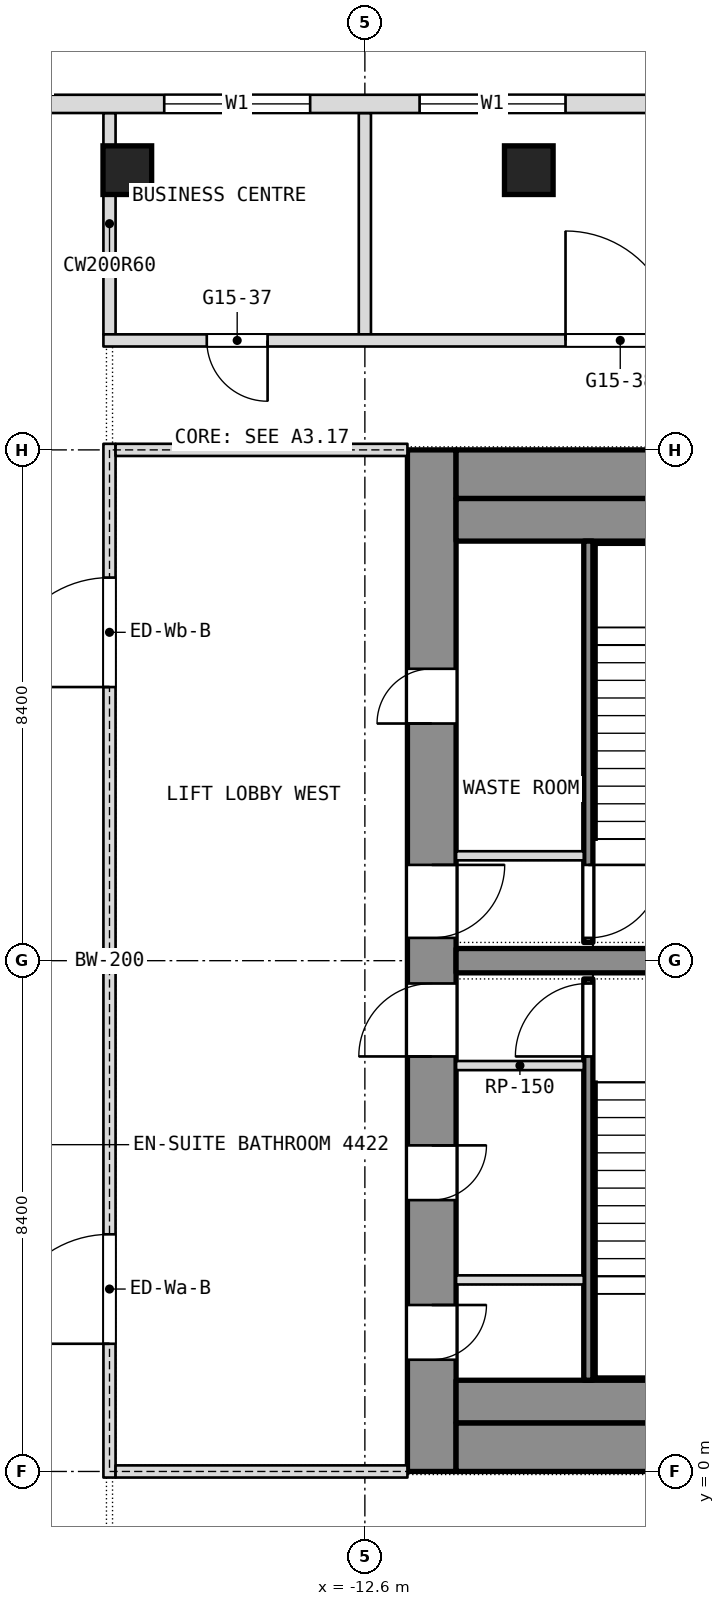
"""IFC4 building model, lengths in metres.
Left out: names, types, materials, properties, quantities, classifications, styles, units other than length and angle.
Written with IfcOpenShell. Run it as: python <this file> out.ifc"""

import sys

from ifc_helpers import new_model, si_unit, direction, frame, frame_2d, origin, origin_2d, place, context, subcontext, project, spatial, rectangle, extrude, element, fill, save


model = new_model("IFC4")
c1 = context("Model", 3, precision=1e-05, world=origin(), true_north=direction((0.0, 1.0)))
c2 = subcontext(c1, "Body", "Model", "MODEL_VIEW")
j1 = project(units=[si_unit("LENGTHUNIT", "METRE"), si_unit("PLANEANGLEUNIT", "RADIAN")], contexts=[c1])
p1 = place(None, origin())
s1 = spatial("IfcSite", under=j1, at=p1, CompositionType="ELEMENT")
p2 = place(p1, origin())
s2 = spatial("IfcBuilding", under=s1, at=p2, CompositionType="ELEMENT")
p3 = place(p2, frame((0.0, 0.0, 194.9)))
s3 = spatial("IfcBuildingStorey", under=s2, at=p3, CompositionType="ELEMENT", Elevation=194.9)
p4 = place(p3, frame((-11.5, 0.0, 0.0), z_axis=(0.0, 0.0, 1.0), x_axis=(0.0, 1.0, 0.0)))
e1 = element("IfcWall", 1, at=p4, inside=s3, PredefinedType="SHEAR", context=c2, shape_type="SweptSolid", body=[
    extrude(rectangle(XDim=16.8, YDim=0.8, at=frame_2d((8.4, 0.0))), origin(), (0.0, 0.0, 1.0), 3.6),
])
p5 = place(p4, frame((1.837, 0.0, 0.0)))
e2 = element("IfcOpeningElement", 2, at=p5, cuts=e1, PredefinedType="OPENING", context=c2, shape_type="SweptSolid", body=[
    extrude(rectangle(XDim=0.9, YDim=2.1, at=frame_2d((0.45, 1.05))), frame((0.0, 0.4, 0.0), z_axis=(0.0, -1.0, 0.0), x_axis=(1.0, 0.0, 0.0)), (0.0, 0.0, 1.0), 0.8),
])
p6 = place(p4, frame((4.462, 0.0, 0.0)))
e3 = element("IfcOpeningElement", 3, at=p6, cuts=e1, PredefinedType="OPENING", context=c2, shape_type="SweptSolid", body=[
    extrude(rectangle(XDim=0.9, YDim=2.1, at=frame_2d((0.45, 1.05))), frame((0.0, 0.4, 0.0), z_axis=(0.0, -1.0, 0.0), x_axis=(1.0, 0.0, 0.0)), (0.0, 0.0, 1.0), 0.8),
])
p7 = place(p4, frame((6.825, 0.0, 0.0)))
e4 = element("IfcOpeningElement", 4, at=p7, cuts=e1, PredefinedType="OPENING", context=c2, shape_type="SweptSolid", body=[
    extrude(rectangle(XDim=1.2, YDim=2.1, at=frame_2d((0.6, 1.05))), frame((0.0, 0.4, 0.0), z_axis=(0.0, -1.0, 0.0), x_axis=(1.0, 0.0, 0.0)), (0.0, 0.0, 1.0), 0.8),
])
p8 = place(p4, frame((12.3, 0.0, 0.0)))
e5 = element("IfcOpeningElement", 5, at=p8, cuts=e1, PredefinedType="OPENING", context=c2, shape_type="SweptSolid", body=[
    extrude(rectangle(XDim=0.9, YDim=2.1, at=frame_2d((0.45, 1.05))), frame((0.0, 0.4, 0.0), z_axis=(0.0, -1.0, 0.0), x_axis=(1.0, 0.0, 0.0)), (0.0, 0.0, 1.0), 0.8),
])
p9 = place(p4, frame((8.775, 0.0, 0.0)))
e6 = element("IfcOpeningElement", 6, at=p9, cuts=e1, PredefinedType="OPENING", context=c2, shape_type="SweptSolid", body=[
    extrude(rectangle(XDim=1.2, YDim=2.1, at=frame_2d((0.6, 1.05))), frame((0.0, 0.4, 0.0), z_axis=(0.0, -1.0, 0.0), x_axis=(1.0, 0.0, 0.0)), (0.0, 0.0, 1.0), 0.8),
])
for number, where, z_axis, x_axis in (
    (7, (-11.1, 0.4, 0.0), (0.0, 0.0, 1.0), (1.0, 0.0, 0.0)),
    (8, (-11.1, 16.4, 0.0), (0.0, 0.0, 1.0), (1.0, 0.0, 0.0)),
):
    element("IfcWall", number, at=place(p3, frame(where, z_axis=z_axis, x_axis=x_axis)), inside=s3, PredefinedType="SHEAR", context=c2, shape_type="SweptSolid", body=[
        extrude(rectangle(XDim=22.2, YDim=0.8, at=frame_2d((11.1, 0.0))), origin(), (0.0, 0.0, 1.0), 3.6),
    ])
p10 = place(p3, frame((-11.1, 8.4, 0.0), z_axis=(0.0, 0.0, 1.0), x_axis=(1.0, 0.0, 0.0)))
e9 = element("IfcWall", 9, at=p10, inside=s3, PredefinedType="SHEAR", context=c2, shape_type="SweptSolid", body=[
    extrude(rectangle(XDim=6.7, YDim=0.4, at=frame_2d((3.35, 0.0))), origin(), (0.0, 0.0, 1.0), 3.6),
])
for number, where, z_axis, x_axis in (
    (10, (-16.507, 21.4, 0.0), (0.0, 0.0, 1.0), (1.0, 0.0, 0.0)),
    (11, (-9.904, 21.4, 0.0), (0.0, 0.0, 1.0), (1.0, 0.0, 0.0)),
):
    element("IfcColumn", number, at=place(p3, frame(where, z_axis=z_axis, x_axis=x_axis)), inside=s3, PredefinedType="COLUMN", context=c2, shape_type="SweptSolid", body=[
        extrude(rectangle(XDim=0.8, YDim=0.8, at=origin_2d()), origin(), (0.0, 0.0, 1.0), 3.6),
    ])
for number, where, z_axis, x_axis in (
    (12, (-12.6, 18.7, 0.0), (0.0, 0.0, 1.0), (0.0, 1.0, 0.0)),
    (13, (-16.8, 18.7, 0.0), (0.0, 0.0, 1.0), (0.0, 1.0, 0.0)),
):
    element("IfcWall", number, at=place(p3, frame(where, z_axis=z_axis, x_axis=x_axis)), inside=s3, PredefinedType="PARTITIONING", context=c2, shape_type="SweptSolid", body=[
        extrude(rectangle(XDim=3.64, YDim=0.2, at=frame_2d((1.82, 0.0))), origin(), (0.0, 0.0, 1.0), 3.34),
    ])
p11 = place(p3, frame((-16.9, 18.6, 0.0), z_axis=(0.0, 0.0, 1.0), x_axis=(1.0, 0.0, 0.0)))
e14 = element("IfcWall", 14, at=p11, inside=s3, PredefinedType="PARTITIONING", context=c2, shape_type="SweptSolid", body=[
    extrude(rectangle(XDim=33.8, YDim=0.2, at=frame_2d((16.9, 0.0))), origin(), (0.0, 0.0, 1.0), 3.34),
])
p12 = place(p11, frame((1.7, 0.0, 0.0)))
e15 = element("IfcOpeningElement", 15, at=p12, cuts=e14, PredefinedType="OPENING", context=c2, shape_type="SweptSolid", body=[
    extrude(rectangle(XDim=1.0, YDim=2.1, at=frame_2d((0.5, 1.05))), frame((0.0, 0.1, 0.0), z_axis=(0.0, -1.0, 0.0), x_axis=(1.0, 0.0, 0.0)), (0.0, 0.0, 1.0), 0.2),
])
p13 = place(p11, frame((7.6, 0.0, 0.0)))
e16 = element("IfcOpeningElement", 16, at=p13, cuts=e14, PredefinedType="OPENING", context=c2, shape_type="SweptSolid", body=[
    extrude(rectangle(XDim=1.8, YDim=2.1, at=frame_2d((0.9, 1.05))), frame((0.0, 0.1, 0.0), z_axis=(0.0, -1.0, 0.0), x_axis=(1.0, 0.0, 0.0)), (0.0, 0.0, 1.0), 0.2),
])
p14 = place(p11, frame((16.0, 0.0, 0.0)))
e17 = element("IfcOpeningElement", 17, at=p14, cuts=e14, PredefinedType="OPENING", context=c2, shape_type="SweptSolid", body=[
    extrude(rectangle(XDim=1.8, YDim=2.1, at=frame_2d((0.9, 1.05))), frame((0.0, 0.1, 0.0), z_axis=(0.0, -1.0, 0.0), x_axis=(1.0, 0.0, 0.0)), (0.0, 0.0, 1.0), 0.2),
])
p15 = place(p11, frame((24.4, 0.0, 0.0)))
e18 = element("IfcOpeningElement", 18, at=p15, cuts=e14, PredefinedType="OPENING", context=c2, shape_type="SweptSolid", body=[
    extrude(rectangle(XDim=1.8, YDim=2.1, at=frame_2d((0.9, 1.05))), frame((0.0, 0.1, 0.0), z_axis=(0.0, -1.0, 0.0), x_axis=(1.0, 0.0, 0.0)), (0.0, 0.0, 1.0), 0.2),
])
p16 = place(p11, frame((31.1, 0.0, 0.0)))
e19 = element("IfcOpeningElement", 19, at=p16, cuts=e14, PredefinedType="OPENING", context=c2, shape_type="SweptSolid", body=[
    extrude(rectangle(XDim=1.0, YDim=2.1, at=frame_2d((0.5, 1.05))), frame((0.0, 0.1, 0.0), z_axis=(0.0, -1.0, 0.0), x_axis=(1.0, 0.0, 0.0)), (0.0, 0.0, 1.0), 0.2),
])
p17 = place(p3, frame((19.206, 22.49, 0.0), z_axis=(0.0, 0.0, 1.0), x_axis=(-1.0, 0.0, 0.0)))
e20 = element("IfcWall", 20, at=p17, inside=s3, PredefinedType="NOTDEFINED", context=c2, shape_type="SweptSolid", body=[
    extrude(rectangle(XDim=38.412, YDim=0.3, at=frame_2d((19.206, 0.0))), origin(), (0.0, 0.0, 1.0), 3.6),
])
p18 = place(p17, frame((3.306, 0.0, 0.9)))
e21 = element("IfcOpeningElement", 21, at=p18, cuts=e20, PredefinedType="OPENING", context=c2, shape_type="SweptSolid", body=[
    extrude(rectangle(XDim=2.4, YDim=2.1, at=frame_2d((1.2, 1.05))), frame((0.0, 0.15, 0.0), z_axis=(0.0, -1.0, 0.0), x_axis=(1.0, 0.0, 0.0)), (0.0, 0.0, 1.0), 0.3),
])
p19 = place(p17, frame((7.506, 0.0, 0.9)))
e22 = element("IfcOpeningElement", 22, at=p19, cuts=e20, PredefinedType="OPENING", context=c2, shape_type="SweptSolid", body=[
    extrude(rectangle(XDim=2.4, YDim=2.1, at=frame_2d((1.2, 1.05))), frame((0.0, 0.15, 0.0), z_axis=(0.0, -1.0, 0.0), x_axis=(1.0, 0.0, 0.0)), (0.0, 0.0, 1.0), 0.3),
])
p20 = place(p17, frame((11.706, 0.0, 0.9)))
e23 = element("IfcOpeningElement", 23, at=p20, cuts=e20, PredefinedType="OPENING", context=c2, shape_type="SweptSolid", body=[
    extrude(rectangle(XDim=2.4, YDim=2.1, at=frame_2d((1.2, 1.05))), frame((0.0, 0.15, 0.0), z_axis=(0.0, -1.0, 0.0), x_axis=(1.0, 0.0, 0.0)), (0.0, 0.0, 1.0), 0.3),
])
p21 = place(p17, frame((15.906, 0.0, 0.9)))
e24 = element("IfcOpeningElement", 24, at=p21, cuts=e20, PredefinedType="OPENING", context=c2, shape_type="SweptSolid", body=[
    extrude(rectangle(XDim=2.4, YDim=2.1, at=frame_2d((1.2, 1.05))), frame((0.0, 0.15, 0.0), z_axis=(0.0, -1.0, 0.0), x_axis=(1.0, 0.0, 0.0)), (0.0, 0.0, 1.0), 0.3),
])
p22 = place(p17, frame((20.106, 0.0, 0.9)))
e25 = element("IfcOpeningElement", 25, at=p22, cuts=e20, PredefinedType="OPENING", context=c2, shape_type="SweptSolid", body=[
    extrude(rectangle(XDim=2.4, YDim=2.1, at=frame_2d((1.2, 1.05))), frame((0.0, 0.15, 0.0), z_axis=(0.0, -1.0, 0.0), x_axis=(1.0, 0.0, 0.0)), (0.0, 0.0, 1.0), 0.3),
])
p23 = place(p17, frame((24.306, 0.0, 0.9)))
e26 = element("IfcOpeningElement", 26, at=p23, cuts=e20, PredefinedType="OPENING", context=c2, shape_type="SweptSolid", body=[
    extrude(rectangle(XDim=2.4, YDim=2.1, at=frame_2d((1.2, 1.05))), frame((0.0, 0.15, 0.0), z_axis=(0.0, -1.0, 0.0), x_axis=(1.0, 0.0, 0.0)), (0.0, 0.0, 1.0), 0.3),
])
p24 = place(p17, frame((28.506, 0.0, 0.9)))
e27 = element("IfcOpeningElement", 27, at=p24, cuts=e20, PredefinedType="OPENING", context=c2, shape_type="SweptSolid", body=[
    extrude(rectangle(XDim=2.4, YDim=2.1, at=frame_2d((1.2, 1.05))), frame((0.0, 0.15, 0.0), z_axis=(0.0, -1.0, 0.0), x_axis=(1.0, 0.0, 0.0)), (0.0, 0.0, 1.0), 0.3),
])
p25 = place(p17, frame((32.706, 0.0, 0.9)))
e28 = element("IfcOpeningElement", 28, at=p25, cuts=e20, PredefinedType="OPENING", context=c2, shape_type="SweptSolid", body=[
    extrude(rectangle(XDim=2.4, YDim=2.1, at=frame_2d((1.2, 1.05))), frame((0.0, 0.15, 0.0), z_axis=(0.0, -1.0, 0.0), x_axis=(1.0, 0.0, 0.0)), (0.0, 0.0, 1.0), 0.3),
])
for number, where, z_axis, x_axis in (
    (29, (-11.1, 1.15, 0.0), (0.0, 0.0, 1.0), (1.0, 0.0, 0.0)),
    (30, (-11.1, 15.65, 0.0), (0.0, 0.0, 1.0), (1.0, 0.0, 0.0)),
):
    element("IfcWall", number, at=place(p3, frame(where, z_axis=z_axis, x_axis=x_axis)), inside=s3, PredefinedType="PARTITIONING", context=c2, shape_type="SweptSolid", body=[
        extrude(rectangle(XDim=22.2, YDim=0.7, at=frame_2d((11.1, 0.0))), origin(), (0.0, 0.0, 1.0), 3.34),
    ])
p26 = place(p3, frame((-8.925, 1.5, 0.0), z_axis=(0.0, 0.0, 1.0), x_axis=(0.0, 1.0, 0.0)))
e31 = element("IfcWall", 31, at=p26, inside=s3, PredefinedType="SHEAR", context=c2, shape_type="SweptSolid", body=[
    extrude(rectangle(XDim=6.6, YDim=0.15, at=frame_2d((3.3, 0.0))), origin(), (0.0, 0.0, 1.0), 3.34),
])
p27 = place(p26, frame((5.325, 0.0, 0.0)))
e32 = element("IfcOpeningElement", 32, at=p27, cuts=e31, PredefinedType="OPENING", context=c2, shape_type="SweptSolid", body=[
    extrude(rectangle(XDim=1.2, YDim=2.1, at=frame_2d((0.6, 1.05))), frame((0.0, 0.075, 0.0), z_axis=(0.0, -1.0, 0.0), x_axis=(1.0, 0.0, 0.0)), (0.0, 0.0, 1.0), 0.15),
])
for number, where, z_axis, x_axis in (
    (33, (-11.1, 6.675, 0.0), (0.0, 0.0, 1.0), (1.0, 0.0, 0.0)),
    (34, (-11.1, 3.15, 0.0), (0.0, 0.0, 1.0), (1.0, 0.0, 0.0)),
):
    element("IfcWall", number, at=place(p3, frame(where, z_axis=z_axis, x_axis=x_axis)), inside=s3, PredefinedType="PARTITIONING", context=c2, shape_type="SweptSolid", body=[
        extrude(rectangle(XDim=2.1, YDim=0.15, at=frame_2d((1.05, 0.0))), origin(), (0.0, 0.0, 1.0), 3.34),
    ])
p28 = place(p3, frame((-8.925, 8.7, 0.0), z_axis=(0.0, 0.0, 1.0), x_axis=(0.0, 1.0, 0.0)))
e35 = element("IfcWall", 35, at=p28, inside=s3, PredefinedType="SHEAR", context=c2, shape_type="SweptSolid", body=[
    extrude(rectangle(XDim=6.6, YDim=0.15, at=frame_2d((3.3, 0.0))), origin(), (0.0, 0.0, 1.0), 3.34),
])
p29 = place(p28, frame((0.075, 0.0, 0.0)))
e36 = element("IfcOpeningElement", 36, at=p29, cuts=e35, PredefinedType="OPENING", context=c2, shape_type="SweptSolid", body=[
    extrude(rectangle(XDim=1.2, YDim=2.1, at=frame_2d((0.6, 1.05))), frame((0.0, 0.075, 0.0), z_axis=(0.0, -1.0, 0.0), x_axis=(1.0, 0.0, 0.0)), (0.0, 0.0, 1.0), 0.15),
])
p30 = place(p3, frame((-11.1, 10.125, 0.0), z_axis=(0.0, 0.0, 1.0), x_axis=(1.0, 0.0, 0.0)))
e37 = element("IfcWall", 37, at=p30, inside=s3, PredefinedType="PARTITIONING", context=c2, shape_type="SweptSolid", body=[
    extrude(rectangle(XDim=2.1, YDim=0.15, at=frame_2d((1.05, 0.0))), origin(), (0.0, 0.0, 1.0), 3.34),
])
p31 = place(p3, frame((-16.8, -0.1, 0.0), z_axis=(0.0, 0.0, 1.0), x_axis=(0.0, 1.0, 0.0)))
e38 = element("IfcWall", 38, at=p31, inside=s3, PredefinedType="PARTITIONING", context=c2, shape_type="SweptSolid", body=[
    extrude(rectangle(XDim=17.0, YDim=0.2, at=frame_2d((8.5, 0.0))), origin(), (0.0, 0.0, 1.0), 3.34),
])
p32 = place(p31, frame((2.2, 0.0, 0.0)))
e39 = element("IfcOpeningElement", 39, at=p32, cuts=e38, PredefinedType="OPENING", context=c2, shape_type="SweptSolid", body=[
    extrude(rectangle(XDim=1.8, YDim=2.1, at=frame_2d((0.9, 1.05))), frame((0.0, 0.1, 0.0), z_axis=(0.0, -1.0, 0.0), x_axis=(1.0, 0.0, 0.0)), (0.0, 0.0, 1.0), 0.2),
])
p33 = place(p31, frame((13.0, 0.0, 0.0)))
e40 = element("IfcOpeningElement", 40, at=p33, cuts=e38, PredefinedType="OPENING", context=c2, shape_type="SweptSolid", body=[
    extrude(rectangle(XDim=1.8, YDim=2.1, at=frame_2d((0.9, 1.05))), frame((0.0, 0.1, 0.0), z_axis=(0.0, -1.0, 0.0), x_axis=(1.0, 0.0, 0.0)), (0.0, 0.0, 1.0), 0.2),
])
for number, where, z_axis, x_axis in (
    (41, (-16.7, 0.0, 0.0), (0.0, 0.0, 1.0), (1.0, 0.0, 0.0)),
    (42, (-16.7, 16.8, 0.0), (0.0, 0.0, 1.0), (1.0, 0.0, 0.0)),
):
    element("IfcWall", number, at=place(p3, frame(where, z_axis=z_axis, x_axis=x_axis)), inside=s3, PredefinedType="PARTITIONING", context=c2, shape_type="SweptSolid", body=[
        extrude(rectangle(XDim=4.8, YDim=0.2, at=frame_2d((2.4, 0.0))), origin(), (0.0, 0.0, 1.0), 2.94),
    ])
p34 = place(p12, origin())
e43 = element("IfcDoor", 43, at=p34, inside=s3, OperationType="SINGLE_SWING_LEFT", PredefinedType="DOOR", context=c2, shape_type="SweptSolid", body=[
    extrude(rectangle(XDim=1.0, YDim=2.1, at=frame_2d((0.5, 1.05))), frame((0.0, 0.025, 0.0), z_axis=(0.0, -1.0, 0.0), x_axis=(1.0, 0.0, 0.0)), (0.0, 0.0, 1.0), 0.05),
])
fill(e15, e43)
p35 = place(p13, origin())
e44 = element("IfcDoor", 44, at=p35, inside=s3, OperationType="DOUBLE_DOOR_SINGLE_SWING", PredefinedType="DOOR", context=c2, shape_type="SweptSolid", body=[
    extrude(rectangle(XDim=1.8, YDim=2.1, at=frame_2d((0.9, 1.05))), frame((0.0, 0.025, 0.0), z_axis=(0.0, -1.0, 0.0), x_axis=(1.0, 0.0, 0.0)), (0.0, 0.0, 1.0), 0.05),
])
fill(e16, e44)
p36 = place(p24, origin())
e45 = element("IfcWindow", 45, at=p36, inside=s3, PartitioningType="SINGLE_PANEL", PredefinedType="WINDOW", context=c2, shape_type="SweptSolid", body=[
    extrude(rectangle(XDim=2.4, YDim=2.1, at=frame_2d((1.2, 1.05))), frame((0.0, 0.03, 0.0), z_axis=(0.0, -1.0, 0.0), x_axis=(1.0, 0.0, 0.0)), (0.0, 0.0, 1.0), 0.06),
])
fill(e27, e45)
p37 = place(p25, origin())
e46 = element("IfcWindow", 46, at=p37, inside=s3, PartitioningType="SINGLE_PANEL", PredefinedType="WINDOW", context=c2, shape_type="SweptSolid", body=[
    extrude(rectangle(XDim=2.4, YDim=2.1, at=frame_2d((1.2, 1.05))), frame((0.0, 0.03, 0.0), z_axis=(0.0, -1.0, 0.0), x_axis=(1.0, 0.0, 0.0)), (0.0, 0.0, 1.0), 0.06),
])
fill(e28, e46)
p38 = place(p5, origin())
e47 = element("IfcDoor", 47, at=p38, inside=s3, OperationType="SINGLE_SWING_LEFT", PredefinedType="DOOR", context=c2, shape_type="SweptSolid", body=[
    extrude(rectangle(XDim=0.9, YDim=2.1, at=frame_2d((0.45, 1.05))), frame((0.0, 0.025, 0.0), z_axis=(0.0, -1.0, 0.0), x_axis=(1.0, 0.0, 0.0)), (0.0, 0.0, 1.0), 0.05),
])
fill(e2, e47)
p39 = place(p6, origin())
e48 = element("IfcDoor", 48, at=p39, inside=s3, OperationType="SINGLE_SWING_LEFT", PredefinedType="DOOR", context=c2, shape_type="SweptSolid", body=[
    extrude(rectangle(XDim=0.9, YDim=2.1, at=frame_2d((0.45, 1.05))), frame((0.0, 0.025, 0.0), z_axis=(0.0, -1.0, 0.0), x_axis=(1.0, 0.0, 0.0)), (0.0, 0.0, 1.0), 0.05),
])
fill(e3, e48)
p40 = place(p7, origin())
e49 = element("IfcDoor", 49, at=p40, inside=s3, OperationType="SINGLE_SWING_LEFT", PredefinedType="DOOR", context=c2, shape_type="SweptSolid", body=[
    extrude(rectangle(XDim=1.2, YDim=2.1, at=frame_2d((0.6, 1.05))), frame((0.0, 0.025, 0.0), z_axis=(0.0, -1.0, 0.0), x_axis=(1.0, 0.0, 0.0)), (0.0, 0.0, 1.0), 0.05),
])
fill(e4, e49)
p41 = place(p27, origin())
e50 = element("IfcDoor", 50, at=p41, inside=s3, OperationType="SINGLE_SWING_LEFT", PredefinedType="DOOR", context=c2, shape_type="SweptSolid", body=[
    extrude(rectangle(XDim=1.2, YDim=2.1, at=frame_2d((0.6, 1.05))), frame((0.0, 0.025, 0.0), z_axis=(0.0, -1.0, 0.0), x_axis=(1.0, 0.0, 0.0)), (0.0, 0.0, 1.0), 0.05),
])
fill(e32, e50)
p42 = place(p8, origin())
e51 = element("IfcDoor", 51, at=p42, inside=s3, OperationType="SINGLE_SWING_LEFT", PredefinedType="DOOR", context=c2, shape_type="SweptSolid", body=[
    extrude(rectangle(XDim=0.9, YDim=2.1, at=frame_2d((0.45, 1.05))), frame((0.0, 0.025, 0.0), z_axis=(0.0, -1.0, 0.0), x_axis=(1.0, 0.0, 0.0)), (0.0, 0.0, 1.0), 0.05),
])
fill(e5, e51)
p43 = place(p9, origin())
e52 = element("IfcDoor", 52, at=p43, inside=s3, OperationType="SINGLE_SWING_LEFT", PredefinedType="DOOR", context=c2, shape_type="SweptSolid", body=[
    extrude(rectangle(XDim=1.2, YDim=2.1, at=frame_2d((0.6, 1.05))), frame((0.0, 0.025, 0.0), z_axis=(0.0, -1.0, 0.0), x_axis=(1.0, 0.0, 0.0)), (0.0, 0.0, 1.0), 0.05),
])
fill(e6, e52)
p44 = place(p29, origin())
e53 = element("IfcDoor", 53, at=p44, inside=s3, OperationType="SINGLE_SWING_LEFT", PredefinedType="DOOR", context=c2, shape_type="SweptSolid", body=[
    extrude(rectangle(XDim=1.2, YDim=2.1, at=frame_2d((0.6, 1.05))), frame((0.0, 0.025, 0.0), z_axis=(0.0, -1.0, 0.0), x_axis=(1.0, 0.0, 0.0)), (0.0, 0.0, 1.0), 0.05),
])
fill(e36, e53)
p45 = place(p32, origin())
e54 = element("IfcDoor", 54, at=p45, inside=s3, OperationType="DOUBLE_DOOR_SINGLE_SWING", PredefinedType="DOOR", context=c2, shape_type="SweptSolid", body=[
    extrude(rectangle(XDim=1.8, YDim=2.1, at=frame_2d((0.9, 1.05))), frame((0.0, 0.025, 0.0), z_axis=(0.0, -1.0, 0.0), x_axis=(1.0, 0.0, 0.0)), (0.0, 0.0, 1.0), 0.05),
])
fill(e39, e54)
p46 = place(p33, origin())
e55 = element("IfcDoor", 55, at=p46, inside=s3, OperationType="DOUBLE_DOOR_SINGLE_SWING", PredefinedType="DOOR", context=c2, shape_type="SweptSolid", body=[
    extrude(rectangle(XDim=1.8, YDim=2.1, at=frame_2d((0.9, 1.05))), frame((0.0, 0.025, 0.0), z_axis=(0.0, -1.0, 0.0), x_axis=(1.0, 0.0, 0.0)), (0.0, 0.0, 1.0), 0.05),
])
fill(e40, e55)
save(model, sys.argv[1])
